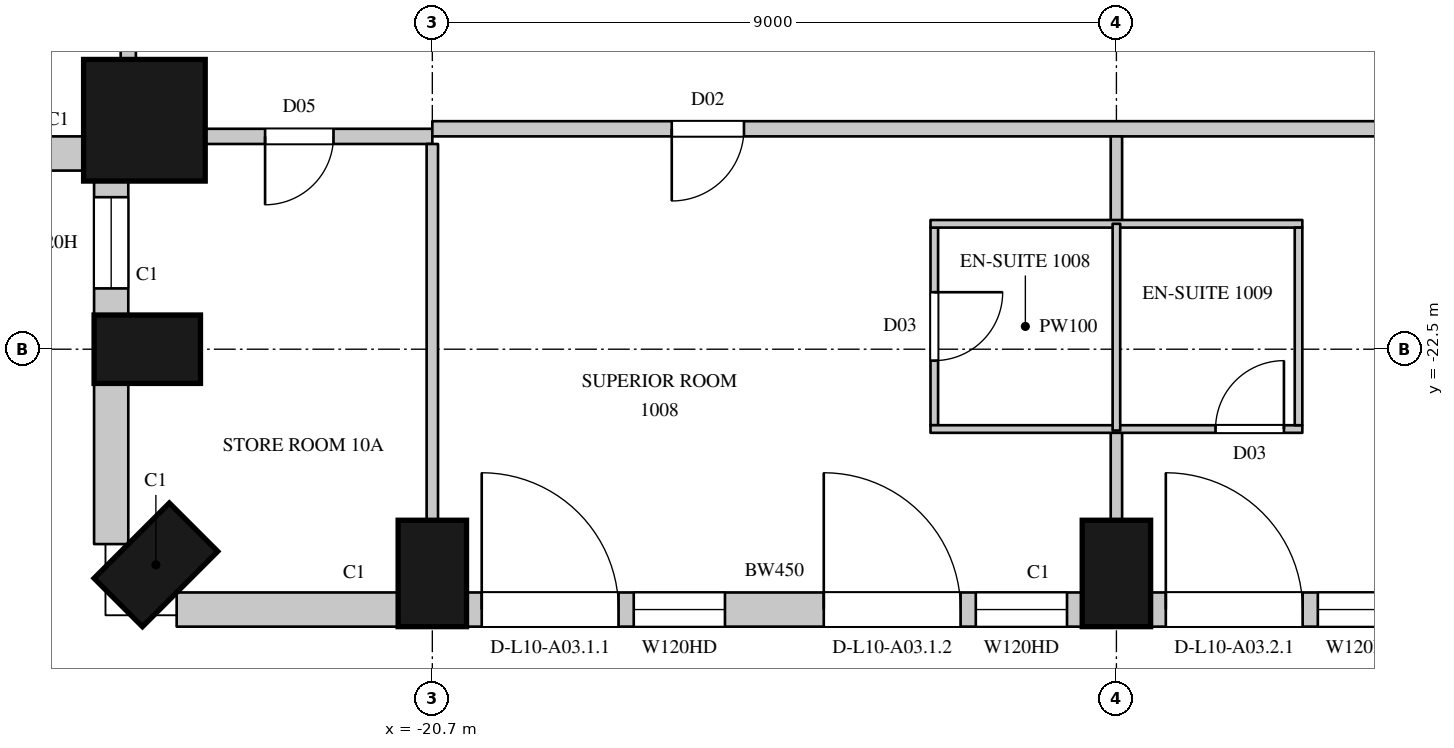
"""IFC4 building model, lengths in metres.
Left out: names, types, materials, properties, quantities, classifications, styles, units other than length and angle.
Written with IfcOpenShell. Run it as: python <this file> out.ifc"""

import sys

from ifc_helpers import new_model, si_unit, direction, frame, frame_2d, origin, origin_2d, place, context, subcontext, project, spatial, rectangle, circle, extrude, element, fill, save


model = new_model("IFC4")
c1 = context("Model", 3, precision=1e-05, world=origin(), true_north=direction((0.0, 1.0)))
c2 = subcontext(c1, "Body", "Model", "MODEL_VIEW")
j1 = project(units=[si_unit("LENGTHUNIT", "METRE"), si_unit("PLANEANGLEUNIT", "RADIAN")], contexts=[c1])
p1 = place(None, origin())
s1 = spatial("IfcSite", under=j1, at=p1, CompositionType="ELEMENT")
p2 = place(p1, origin())
s2 = spatial("IfcBuilding", under=s1, at=p2, CompositionType="ELEMENT")
p3 = place(p2, frame((0.0, 0.0, 66.3)))
s3 = spatial("IfcBuildingStorey", under=s2, at=p3, CompositionType="ELEMENT", Elevation=66.3)
p4 = place(p3, frame((-24.488, -19.488, 0.0), z_axis=(0.0, 0.0, 1.0), x_axis=(1.0, 0.0, 0.0)))
e1 = element("IfcColumn", 1, at=p4, inside=s3, PredefinedType="COLUMN", context=c2, shape_type="SweptSolid", body=[
    extrude(circle(Radius=0.8, at=origin_2d()), origin(), (0.0, 0.0, 1.0), 3.6),
])
for number, where, z_axis, x_axis in (
    (2, (-24.45, -22.5, 0.0), (0.0, 0.0, 1.0), (0.0, -1.0, 0.0)),
    (3, (-24.337, -25.337, 0.0), (0.0, 0.0, 1.0), (0.707, -0.707, 0.0)),
    (4, (-20.7, -25.45, 0.0), (0.0, 0.0, 1.0), (1.0, 0.0, 0.0)),
    (5, (-11.7, -25.45, 0.0), (0.0, 0.0, 1.0), (1.0, 0.0, 0.0)),
):
    element("IfcColumn", number, at=place(p3, frame(where, z_axis=z_axis, x_axis=x_axis)), inside=s3, PredefinedType="COLUMN", context=c2, shape_type="SweptSolid", body=[
        extrude(rectangle(XDim=0.9, YDim=1.4, at=origin_2d()), origin(), (0.0, 0.0, 1.0), 3.6),
    ])
p5 = place(p3, frame((-29.064, -19.925, 0.0), z_axis=(0.0, 0.0, 1.0), x_axis=(1.0, 0.0, 0.0)))
e6 = element("IfcWall", 6, at=p5, inside=s3, PredefinedType="SOLIDWALL", context=c2, shape_type="SweptSolid", body=[
    extrude(rectangle(XDim=3.805, YDim=0.45, at=frame_2d((1.903, 0.0))), origin(), (0.0, 0.0, 1.0), 3.3),
])
p6 = place(p5, frame((0.514, 0.0, 1.05)))
e7 = element("IfcOpeningElement", 7, at=p6, cuts=e6, PredefinedType="OPENING", context=c2, shape_type="SweptSolid", body=[
    extrude(rectangle(XDim=2.7, YDim=2.0, at=frame_2d((1.35, 1.0))), frame((0.0, 0.235, 0.0), z_axis=(0.0, -1.0, 0.0), x_axis=(1.0, 0.0, 0.0)), (0.0, 0.0, 1.0), 0.47),
])
p7 = place(p3, frame((-24.925, -20.259, 0.0), z_axis=(0.0, 0.0, 1.0), x_axis=(0.0, -1.0, 0.0)))
e8 = element("IfcWall", 8, at=p7, inside=s3, PredefinedType="SOLIDWALL", context=c2, shape_type="SweptSolid", body=[
    extrude(rectangle(XDim=1.792, YDim=0.45, at=frame_2d((0.896, 0.0))), origin(), (0.0, 0.0, 1.0), 3.3),
])
p8 = place(p7, frame((0.241, 0.0, 1.05)))
e9 = element("IfcOpeningElement", 9, at=p8, cuts=e8, PredefinedType="OPENING", context=c2, shape_type="SweptSolid", body=[
    extrude(rectangle(XDim=1.2, YDim=2.0, at=frame_2d((0.6, 1.0))), frame((0.0, 0.235, 0.0), z_axis=(0.0, -1.0, 0.0), x_axis=(1.0, 0.0, 0.0)), (0.0, 0.0, 1.0), 0.47),
])
p9 = place(p3, frame((-24.925, -22.95, 0.0), z_axis=(0.0, 0.0, 1.0), x_axis=(0.0, -1.0, 0.0)))
e10 = element("IfcWall", 10, at=p9, inside=s3, PredefinedType="SOLIDWALL", context=c2, shape_type="SweptSolid", body=[
    extrude(rectangle(XDim=2.114, YDim=0.45, at=frame_2d((1.057, 0.0))), origin(), (0.0, 0.0, 1.0), 3.3),
])
p10 = place(p3, frame((-24.064, -25.925, 0.0), z_axis=(0.0, 0.0, 1.0), x_axis=(1.0, 0.0, 0.0)))
e11 = element("IfcWall", 11, at=p10, inside=s3, PredefinedType="SOLIDWALL", context=c2, shape_type="SweptSolid", body=[
    extrude(rectangle(XDim=2.914, YDim=0.45, at=frame_2d((1.457, 0.0))), origin(), (0.0, 0.0, 1.0), 3.3),
])
p11 = place(p3, frame((-20.25, -25.925, 0.0), z_axis=(0.0, 0.0, 1.0), x_axis=(1.0, 0.0, 0.0)))
e12 = element("IfcWall", 12, at=p11, inside=s3, PredefinedType="SOLIDWALL", context=c2, shape_type="SweptSolid", body=[
    extrude(rectangle(XDim=8.1, YDim=0.45, at=frame_2d((4.05, 0.0))), origin(), (0.0, 0.0, 1.0), 3.3),
])
p12 = place(p11, frame((0.2, 0.0, 0.0)))
e13 = element("IfcOpeningElement", 13, at=p12, cuts=e12, PredefinedType="OPENING", context=c2, shape_type="SweptSolid", body=[
    extrude(rectangle(XDim=1.8, YDim=2.4, at=frame_2d((0.9, 1.2))), frame((0.0, 0.235, 0.0), z_axis=(0.0, -1.0, 0.0), x_axis=(1.0, 0.0, 0.0)), (0.0, 0.0, 1.0), 0.47),
])
p13 = place(p11, frame((2.2, 0.0, 1.05)))
e14 = element("IfcOpeningElement", 14, at=p13, cuts=e12, PredefinedType="OPENING", context=c2, shape_type="SweptSolid", body=[
    extrude(rectangle(XDim=1.2, YDim=2.0, at=frame_2d((0.6, 1.0))), frame((0.0, 0.235, 0.0), z_axis=(0.0, -1.0, 0.0), x_axis=(1.0, 0.0, 0.0)), (0.0, 0.0, 1.0), 0.47),
])
p14 = place(p11, frame((4.7, 0.0, 0.0)))
e15 = element("IfcOpeningElement", 15, at=p14, cuts=e12, PredefinedType="OPENING", context=c2, shape_type="SweptSolid", body=[
    extrude(rectangle(XDim=1.8, YDim=2.4, at=frame_2d((0.9, 1.2))), frame((0.0, 0.235, 0.0), z_axis=(0.0, -1.0, 0.0), x_axis=(1.0, 0.0, 0.0)), (0.0, 0.0, 1.0), 0.47),
])
p15 = place(p11, frame((6.7, 0.0, 1.05)))
e16 = element("IfcOpeningElement", 16, at=p15, cuts=e12, PredefinedType="OPENING", context=c2, shape_type="SweptSolid", body=[
    extrude(rectangle(XDim=1.2, YDim=2.0, at=frame_2d((0.6, 1.0))), frame((0.0, 0.235, 0.0), z_axis=(0.0, -1.0, 0.0), x_axis=(1.0, 0.0, 0.0)), (0.0, 0.0, 1.0), 0.47),
])
p16 = place(p3, frame((-11.25, -25.925, 0.0), z_axis=(0.0, 0.0, 1.0), x_axis=(1.0, 0.0, 0.0)))
e17 = element("IfcWall", 17, at=p16, inside=s3, PredefinedType="SOLIDWALL", context=c2, shape_type="SweptSolid", body=[
    extrude(rectangle(XDim=8.1, YDim=0.45, at=frame_2d((4.05, 0.0))), origin(), (0.0, 0.0, 1.0), 3.3),
])
p17 = place(p16, frame((0.2, 0.0, 0.0)))
e18 = element("IfcOpeningElement", 18, at=p17, cuts=e17, PredefinedType="OPENING", context=c2, shape_type="SweptSolid", body=[
    extrude(rectangle(XDim=1.8, YDim=2.4, at=frame_2d((0.9, 1.2))), frame((0.0, 0.235, 0.0), z_axis=(0.0, -1.0, 0.0), x_axis=(1.0, 0.0, 0.0)), (0.0, 0.0, 1.0), 0.47),
])
p18 = place(p16, frame((2.2, 0.0, 1.05)))
e19 = element("IfcOpeningElement", 19, at=p18, cuts=e17, PredefinedType="OPENING", context=c2, shape_type="SweptSolid", body=[
    extrude(rectangle(XDim=1.2, YDim=2.0, at=frame_2d((0.6, 1.0))), frame((0.0, 0.235, 0.0), z_axis=(0.0, -1.0, 0.0), x_axis=(1.0, 0.0, 0.0)), (0.0, 0.0, 1.0), 0.47),
])
p19 = place(p16, frame((4.7, 0.0, 0.0)))
e20 = element("IfcOpeningElement", 20, at=p19, cuts=e17, PredefinedType="OPENING", context=c2, shape_type="SweptSolid", body=[
    extrude(rectangle(XDim=1.8, YDim=2.4, at=frame_2d((0.9, 1.2))), frame((0.0, 0.235, 0.0), z_axis=(0.0, -1.0, 0.0), x_axis=(1.0, 0.0, 0.0)), (0.0, 0.0, 1.0), 0.47),
])
p20 = place(p16, frame((6.7, 0.0, 1.05)))
e21 = element("IfcOpeningElement", 21, at=p20, cuts=e17, PredefinedType="OPENING", context=c2, shape_type="SweptSolid", body=[
    extrude(rectangle(XDim=1.2, YDim=2.0, at=frame_2d((0.6, 1.0))), frame((0.0, 0.235, 0.0), z_axis=(0.0, -1.0, 0.0), x_axis=(1.0, 0.0, 0.0)), (0.0, 0.0, 1.0), 0.47),
])
p21 = place(p3, frame((-24.7, -18.7, 0.0), z_axis=(0.0, 0.0, 1.0), x_axis=(0.0, 1.0, 0.0)))
e22 = element("IfcWall", 22, at=p21, inside=s3, PredefinedType="PARTITIONING", context=c2, shape_type="SweptSolid", body=[
    extrude(rectangle(XDim=2.67, YDim=0.2, at=frame_2d((1.335, 0.0))), origin(), (0.0, 0.0, 1.0), 3.3),
])
p22 = place(p21, frame((0.6, 0.0, 0.0)))
e23 = element("IfcOpeningElement", 23, at=p22, cuts=e22, PredefinedType="OPENING", context=c2, shape_type="SweptSolid", body=[
    extrude(rectangle(XDim=1.6, YDim=2.4, at=frame_2d((0.8, 1.2))), frame((0.0, 0.11, 0.0), z_axis=(0.0, -1.0, 0.0), x_axis=(1.0, 0.0, 0.0)), (0.0, 0.0, 1.0), 0.22),
])
p23 = place(p3, frame((-23.7, -19.7, 0.0), z_axis=(0.0, 0.0, 1.0), x_axis=(1.0, 0.0, 0.0)))
e24 = element("IfcWall", 24, at=p23, inside=s3, PredefinedType="PARTITIONING", context=c2, shape_type="SweptSolid", body=[
    extrude(rectangle(XDim=3.0, YDim=0.2, at=frame_2d((1.5, 0.0))), origin(), (0.0, 0.0, 1.0), 3.3),
])
p24 = place(p23, frame((0.8, 0.0, 0.0)))
e25 = element("IfcOpeningElement", 25, at=p24, cuts=e24, PredefinedType="OPENING", context=c2, shape_type="SweptSolid", body=[
    extrude(rectangle(XDim=0.9, YDim=2.2, at=frame_2d((0.45, 1.1))), frame((0.0, 0.11, 0.0), z_axis=(0.0, -1.0, 0.0), x_axis=(1.0, 0.0, 0.0)), (0.0, 0.0, 1.0), 0.22),
])
p25 = place(p3, frame((-20.7, -19.6, 0.0), z_axis=(0.0, 0.0, 1.0), x_axis=(1.0, 0.0, 0.0)))
e26 = element("IfcWall", 26, at=p25, inside=s3, PredefinedType="PARTITIONING", context=c2, shape_type="SweptSolid", body=[
    extrude(rectangle(XDim=38.825, YDim=0.2, at=frame_2d((19.413, 0.0))), origin(), (0.0, 0.0, 1.0), 3.3),
])
p26 = place(p25, frame((3.15, 0.0, 0.0)))
e27 = element("IfcOpeningElement", 27, at=p26, cuts=e26, PredefinedType="OPENING", context=c2, shape_type="SweptSolid", body=[
    extrude(rectangle(XDim=0.95, YDim=2.2, at=frame_2d((0.475, 1.1))), frame((0.0, 0.11, 0.0), z_axis=(0.0, -1.0, 0.0), x_axis=(1.0, 0.0, 0.0)), (0.0, 0.0, 1.0), 0.22),
])
p27 = place(p25, frame((13.9, 0.0, 0.0)))
e28 = element("IfcOpeningElement", 28, at=p27, cuts=e26, PredefinedType="OPENING", context=c2, shape_type="SweptSolid", body=[
    extrude(rectangle(XDim=0.95, YDim=2.2, at=frame_2d((0.475, 1.1))), frame((0.0, 0.11, 0.0), z_axis=(0.0, -1.0, 0.0), x_axis=(1.0, 0.0, 0.0)), (0.0, 0.0, 1.0), 0.22),
])
p28 = place(p25, frame((21.15, 0.0, 0.0)))
e29 = element("IfcOpeningElement", 29, at=p28, cuts=e26, PredefinedType="OPENING", context=c2, shape_type="SweptSolid", body=[
    extrude(rectangle(XDim=0.95, YDim=2.2, at=frame_2d((0.475, 1.1))), frame((0.0, 0.11, 0.0), z_axis=(0.0, -1.0, 0.0), x_axis=(1.0, 0.0, 0.0)), (0.0, 0.0, 1.0), 0.22),
])
p29 = place(p25, frame((29.75, 0.0, 0.0)))
e30 = element("IfcOpeningElement", 30, at=p29, cuts=e26, PredefinedType="OPENING", context=c2, shape_type="SweptSolid", body=[
    extrude(rectangle(XDim=1.1, YDim=2.4, at=frame_2d((0.55, 1.2))), frame((0.0, 0.11, 0.0), z_axis=(0.0, -1.0, 0.0), x_axis=(1.0, 0.0, 0.0)), (0.0, 0.0, 1.0), 0.22),
])
p30 = place(p3, frame((-20.7, -24.75, 0.0), z_axis=(0.0, 0.0, 1.0), x_axis=(0.0, 1.0, 0.0)))
e31 = element("IfcWall", 31, at=p30, inside=s3, PredefinedType="PARTITIONING", context=c2, shape_type="SweptSolid", body=[
    extrude(rectangle(XDim=4.95, YDim=0.15, at=frame_2d((2.475, 0.0))), origin(), (0.0, 0.0, 1.0), 2.75),
])
p31 = place(p3, frame((-11.7, -24.75, 0.0), z_axis=(0.0, 0.0, 1.0), x_axis=(0.0, 1.0, 0.0)))
e32 = element("IfcWall", 32, at=p31, inside=s3, PredefinedType="PARTITIONING", context=c2, shape_type="SweptSolid", body=[
    extrude(rectangle(XDim=1.18, YDim=0.15, at=frame_2d((0.59, 0.0))), origin(), (0.0, 0.0, 1.0), 2.75),
])
p32 = place(p3, frame((-11.7, -20.85, 0.0), z_axis=(0.0, 0.0, 1.0), x_axis=(0.0, 1.0, 0.0)))
e33 = element("IfcWall", 33, at=p32, inside=s3, PredefinedType="PARTITIONING", context=c2, shape_type="SweptSolid", body=[
    extrude(rectangle(XDim=1.15, YDim=0.15, at=frame_2d((0.575, 0.0))), origin(), (0.0, 0.0, 1.0), 2.75),
])
p33 = place(p3, frame((-14.096, -23.5, 0.0), z_axis=(0.0, 0.0, 1.0), x_axis=(0.0, 1.0, 0.0)))
e34 = element("IfcWall", 34, at=p33, inside=s3, PredefinedType="PARTITIONING", context=c2, shape_type="SweptSolid", body=[
    extrude(rectangle(XDim=2.6, YDim=0.1, at=frame_2d((1.3, 0.0))), origin(), (0.0, 0.0, 1.0), 3.3),
])
p34 = place(p33, frame((0.85, 0.0, 0.0)))
e35 = element("IfcOpeningElement", 35, at=p34, cuts=e34, PredefinedType="OPENING", context=c2, shape_type="SweptSolid", body=[
    extrude(rectangle(XDim=0.9, YDim=2.2, at=frame_2d((0.45, 1.1))), frame((0.0, 0.06, 0.0), z_axis=(0.0, -1.0, 0.0), x_axis=(1.0, 0.0, 0.0)), (0.0, 0.0, 1.0), 0.12),
])
p35 = place(p3, frame((-14.146, -23.55, 0.0), z_axis=(0.0, 0.0, 1.0), x_axis=(1.0, 0.0, 0.0)))
e36 = element("IfcWall", 36, at=p35, inside=s3, PredefinedType="PARTITIONING", context=c2, shape_type="SweptSolid", body=[
    extrude(rectangle(XDim=4.892, YDim=0.1, at=frame_2d((2.446, 0.0))), origin(), (0.0, 0.0, 1.0), 3.3),
])
p36 = place(p35, frame((3.75, 0.0, 0.0)))
e37 = element("IfcOpeningElement", 37, at=p36, cuts=e36, PredefinedType="OPENING", context=c2, shape_type="SweptSolid", body=[
    extrude(rectangle(XDim=0.9, YDim=2.2, at=frame_2d((0.45, 1.1))), frame((0.0, 0.06, 0.0), z_axis=(0.0, -1.0, 0.0), x_axis=(1.0, 0.0, 0.0)), (0.0, 0.0, 1.0), 0.12),
])
p37 = place(p3, frame((-14.146, -20.85, 0.0), z_axis=(0.0, 0.0, 1.0), x_axis=(1.0, 0.0, 0.0)))
e38 = element("IfcWall", 38, at=p37, inside=s3, PredefinedType="PARTITIONING", context=c2, shape_type="SweptSolid", body=[
    extrude(rectangle(XDim=4.892, YDim=0.1, at=frame_2d((2.446, 0.0))), origin(), (0.0, 0.0, 1.0), 3.3),
])
p38 = place(p3, frame((-11.7, -23.57, 0.0), z_axis=(0.0, 0.0, 1.0), x_axis=(0.0, 1.0, 0.0)))
e39 = element("IfcWall", 39, at=p38, inside=s3, PredefinedType="PARTITIONING", context=c2, shape_type="SweptSolid", body=[
    extrude(rectangle(XDim=2.72, YDim=0.1, at=frame_2d((1.36, 0.0))), origin(), (0.0, 0.0, 1.0), 2.75),
])
p39 = place(p3, frame((-9.304, -23.5, 0.0), z_axis=(0.0, 0.0, 1.0), x_axis=(0.0, 1.0, 0.0)))
e40 = element("IfcWall", 40, at=p39, inside=s3, PredefinedType="PARTITIONING", context=c2, shape_type="SweptSolid", body=[
    extrude(rectangle(XDim=2.6, YDim=0.1, at=frame_2d((1.3, 0.0))), origin(), (0.0, 0.0, 1.0), 3.3),
])
p40 = place(p8, origin())
e41 = element("IfcWindow", 41, at=p40, inside=s3, PartitioningType="SINGLE_PANEL", PredefinedType="WINDOW", context=c2, shape_type="SweptSolid", body=[
    extrude(rectangle(XDim=1.2, YDim=2.0, at=frame_2d((0.6, 1.0))), frame((0.0, 0.135, 0.0), z_axis=(0.0, -1.0, 0.0), x_axis=(1.0, 0.0, 0.0)), (0.0, 0.0, 1.0), 0.06),
])
fill(e9, e41)
p41 = place(p12, origin())
e42 = element("IfcDoor", 42, at=p41, inside=s3, OperationType="SLIDING_TO_LEFT", PredefinedType="DOOR", context=c2, shape_type="SweptSolid", body=[
    extrude(rectangle(XDim=1.8, YDim=2.4, at=frame_2d((0.9, 1.2))), frame((0.0, 0.13, 0.0), z_axis=(0.0, -1.0, 0.0), x_axis=(1.0, 0.0, 0.0)), (0.0, 0.0, 1.0), 0.05),
])
fill(e13, e42)
p42 = place(p13, origin())
e43 = element("IfcWindow", 43, at=p42, inside=s3, PartitioningType="SINGLE_PANEL", PredefinedType="WINDOW", context=c2, shape_type="SweptSolid", body=[
    extrude(rectangle(XDim=1.2, YDim=2.0, at=frame_2d((0.6, 1.0))), frame((0.0, 0.135, 0.0), z_axis=(0.0, -1.0, 0.0), x_axis=(1.0, 0.0, 0.0)), (0.0, 0.0, 1.0), 0.06),
])
fill(e14, e43)
p43 = place(p14, origin())
e44 = element("IfcDoor", 44, at=p43, inside=s3, OperationType="SLIDING_TO_LEFT", PredefinedType="DOOR", context=c2, shape_type="SweptSolid", body=[
    extrude(rectangle(XDim=1.8, YDim=2.4, at=frame_2d((0.9, 1.2))), frame((0.0, 0.13, 0.0), z_axis=(0.0, -1.0, 0.0), x_axis=(1.0, 0.0, 0.0)), (0.0, 0.0, 1.0), 0.05),
])
fill(e15, e44)
p44 = place(p15, origin())
e45 = element("IfcWindow", 45, at=p44, inside=s3, PartitioningType="SINGLE_PANEL", PredefinedType="WINDOW", context=c2, shape_type="SweptSolid", body=[
    extrude(rectangle(XDim=1.2, YDim=2.0, at=frame_2d((0.6, 1.0))), frame((0.0, 0.135, 0.0), z_axis=(0.0, -1.0, 0.0), x_axis=(1.0, 0.0, 0.0)), (0.0, 0.0, 1.0), 0.06),
])
fill(e16, e45)
p45 = place(p17, origin())
e46 = element("IfcDoor", 46, at=p45, inside=s3, OperationType="SLIDING_TO_LEFT", PredefinedType="DOOR", context=c2, shape_type="SweptSolid", body=[
    extrude(rectangle(XDim=1.8, YDim=2.4, at=frame_2d((0.9, 1.2))), frame((0.0, 0.13, 0.0), z_axis=(0.0, -1.0, 0.0), x_axis=(1.0, 0.0, 0.0)), (0.0, 0.0, 1.0), 0.05),
])
fill(e18, e46)
p46 = place(p18, origin())
e47 = element("IfcWindow", 47, at=p46, inside=s3, PartitioningType="SINGLE_PANEL", PredefinedType="WINDOW", context=c2, shape_type="SweptSolid", body=[
    extrude(rectangle(XDim=1.2, YDim=2.0, at=frame_2d((0.6, 1.0))), frame((0.0, 0.135, 0.0), z_axis=(0.0, -1.0, 0.0), x_axis=(1.0, 0.0, 0.0)), (0.0, 0.0, 1.0), 0.06),
])
fill(e19, e47)
p47 = place(p24, origin())
e48 = element("IfcDoor", 48, at=p47, inside=s3, OperationType="SINGLE_SWING_RIGHT", PredefinedType="DOOR", context=c2, shape_type="SweptSolid", body=[
    extrude(rectangle(XDim=0.9, YDim=2.2, at=frame_2d((0.45, 1.1))), frame((0.0, 0.025, 0.0), z_axis=(0.0, -1.0, 0.0), x_axis=(1.0, 0.0, 0.0)), (0.0, 0.0, 1.0), 0.05),
])
fill(e25, e48)
p48 = place(p26, origin())
e49 = element("IfcDoor", 49, at=p48, inside=s3, OperationType="SINGLE_SWING_RIGHT", PredefinedType="DOOR", context=c2, shape_type="SweptSolid", body=[
    extrude(rectangle(XDim=0.95, YDim=2.2, at=frame_2d((0.475, 1.1))), frame((0.0, 0.025, 0.0), z_axis=(0.0, -1.0, 0.0), x_axis=(1.0, 0.0, 0.0)), (0.0, 0.0, 1.0), 0.05),
])
fill(e27, e49)
p49 = place(p34, origin())
e50 = element("IfcDoor", 50, at=p49, inside=s3, OperationType="SINGLE_SWING_LEFT", PredefinedType="DOOR", context=c2, shape_type="SweptSolid", body=[
    extrude(rectangle(XDim=0.9, YDim=2.2, at=frame_2d((0.45, 1.1))), frame((0.0, 0.025, 0.0), z_axis=(0.0, -1.0, 0.0), x_axis=(1.0, 0.0, 0.0)), (0.0, 0.0, 1.0), 0.05),
])
fill(e35, e50)
p50 = place(p36, origin())
e51 = element("IfcDoor", 51, at=p50, inside=s3, OperationType="SINGLE_SWING_RIGHT", PredefinedType="DOOR", context=c2, shape_type="SweptSolid", body=[
    extrude(rectangle(XDim=0.9, YDim=2.2, at=frame_2d((0.45, 1.1))), frame((0.0, 0.025, 0.0), z_axis=(0.0, -1.0, 0.0), x_axis=(1.0, 0.0, 0.0)), (0.0, 0.0, 1.0), 0.05),
])
fill(e37, e51)
save(model, sys.argv[1])
